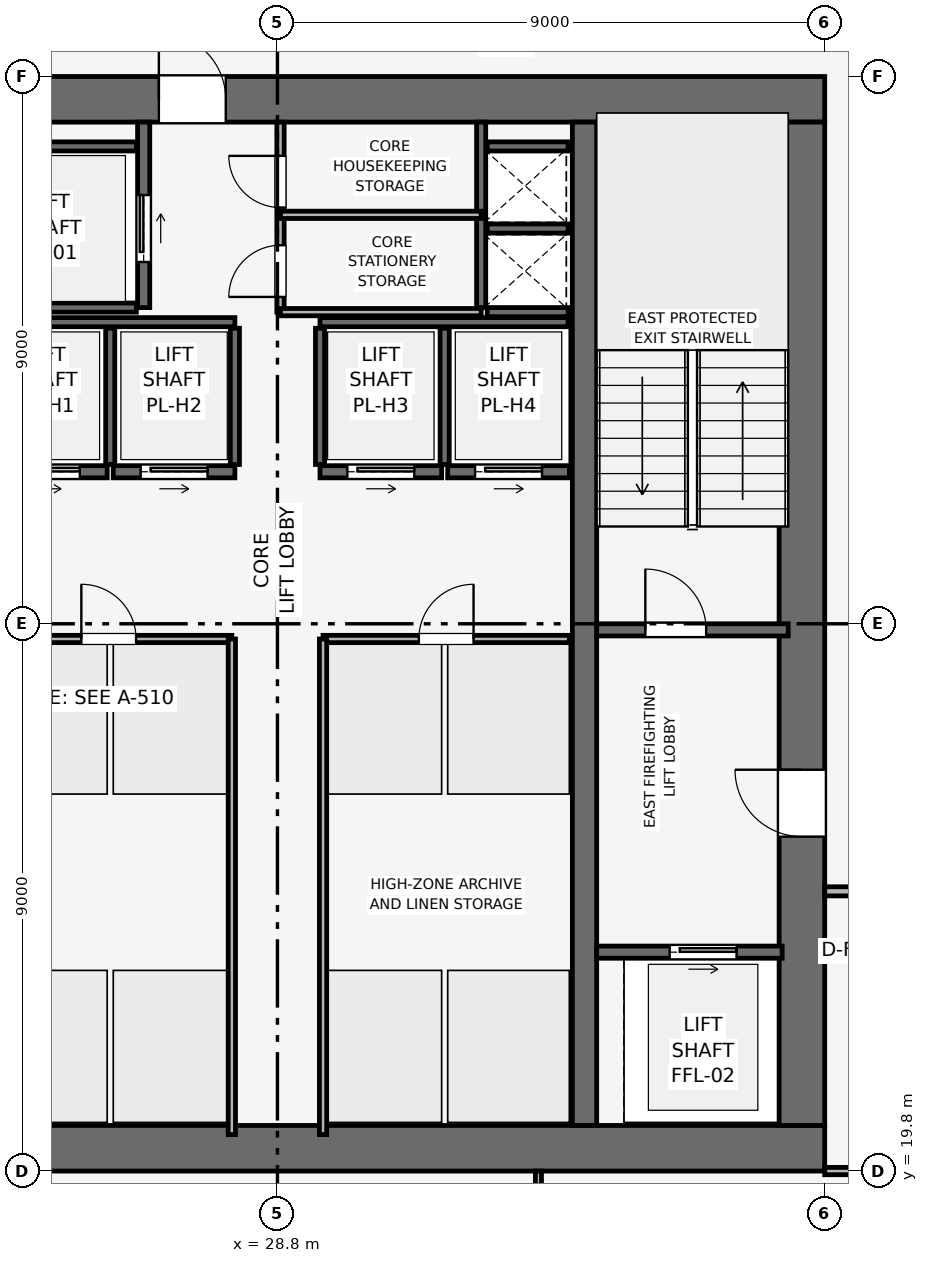
"""IFC4 building model, lengths in metres.
Left out: names, types, materials, properties, quantities, classifications, styles, units other than length and angle.
Written with IfcOpenShell. Run it as: python <this file> out.ifc"""

import sys

from ifc_helpers import new_model, si_unit, direction, frame, frame_2d, origin, place, context, subcontext, project, spatial, rectangle, extrude, element, fill, save


model = new_model("IFC4")
c1 = context("Model", 3, precision=1e-05, world=origin(), true_north=direction((0.0, 1.0)))
c2 = subcontext(c1, "Body", "Model", "MODEL_VIEW")
j1 = project(units=[si_unit("LENGTHUNIT", "METRE"), si_unit("PLANEANGLEUNIT", "RADIAN")], contexts=[c1])
p1 = place(None, origin())
s1 = spatial("IfcSite", under=j1, at=p1, CompositionType="ELEMENT")
p2 = place(p1, origin())
s2 = spatial("IfcBuilding", under=s1, at=p2, CompositionType="ELEMENT")
p3 = place(p2, frame((0.0, 0.0, 280.35)))
s3 = spatial("IfcBuildingStorey", under=s2, at=p3, CompositionType="ELEMENT", Elevation=280.35)
p4 = place(p3, frame((19.8, 20.175, 0.0), z_axis=(0.0, 0.0, 1.0), x_axis=(1.0, 0.0, 0.0)))
e1 = element("IfcWall", 1, at=p4, inside=s3, PredefinedType="SHEAR", context=c2, shape_type="SweptSolid", body=[
    extrude(rectangle(XDim=18.0, YDim=0.75, at=frame_2d((9.0, 0.0))), origin(), (0.0, 0.0, 1.0), 3.75),
])
p5 = place(p3, frame((19.8, 37.425, 0.0), z_axis=(0.0, 0.0, 1.0), x_axis=(1.0, 0.0, 0.0)))
e2 = element("IfcWall", 2, at=p5, inside=s3, PredefinedType="SHEAR", context=c2, shape_type="SweptSolid", body=[
    extrude(rectangle(XDim=18.0, YDim=0.75, at=frame_2d((9.0, 0.0))), origin(), (0.0, 0.0, 1.0), 3.75),
])
p6 = place(p5, frame((7.05, 0.0, 0.0)))
e3 = element("IfcOpeningElement", 3, at=p6, cuts=e2, PredefinedType="OPENING", context=c2, shape_type="SweptSolid", body=[
    extrude(rectangle(XDim=1.1, YDim=2.15, at=frame_2d((0.55, 1.075))), frame((0.0, 0.385, 0.0), z_axis=(0.0, -1.0, 0.0), x_axis=(1.0, 0.0, 0.0)), (0.0, 0.0, 1.0), 0.77),
])
p7 = place(p3, frame((37.425, 20.55, 0.0), z_axis=(0.0, 0.0, 1.0), x_axis=(0.0, 1.0, 0.0)))
e4 = element("IfcWall", 4, at=p7, inside=s3, PredefinedType="SHEAR", context=c2, shape_type="SweptSolid", body=[
    extrude(rectangle(XDim=16.5, YDim=0.75, at=frame_2d((8.25, 0.0))), origin(), (0.0, 0.0, 1.0), 3.75),
])
p8 = place(p7, frame((4.75, 0.0, 0.0)))
e5 = element("IfcOpeningElement", 5, at=p8, cuts=e4, PredefinedType="OPENING", context=c2, shape_type="SweptSolid", body=[
    extrude(rectangle(XDim=1.1, YDim=2.15, at=frame_2d((0.55, 1.075))), frame((0.0, 0.385, 0.0), z_axis=(0.0, -1.0, 0.0), x_axis=(1.0, 0.0, 0.0)), (0.0, 0.0, 1.0), 0.77),
])
p9 = place(p3, frame((33.85, 20.55, 0.0), z_axis=(0.0, 0.0, 1.0), x_axis=(0.0, 1.0, 0.0)))
e6 = element("IfcWall", 6, at=p9, inside=s3, PredefinedType="SHEAR", context=c2, shape_type="SweptSolid", body=[
    extrude(rectangle(XDim=16.5, YDim=0.4, at=frame_2d((8.25, 0.0))), origin(), (0.0, 0.0, 1.0), 3.75),
])
p10 = place(p3, frame((34.05, 28.7, 0.0), z_axis=(0.0, 0.0, 1.0), x_axis=(1.0, 0.0, 0.0)))
e7 = element("IfcWall", 7, at=p10, inside=s3, PredefinedType="SHEAR", context=c2, shape_type="SweptSolid", body=[
    extrude(rectangle(XDim=3.15, YDim=0.2, at=frame_2d((1.575, 0.0))), origin(), (0.0, 0.0, 1.0), 3.39),
])
p11 = place(p10, frame((0.8, 0.0, 0.0)))
e8 = element("IfcOpeningElement", 8, at=p11, cuts=e7, PredefinedType="OPENING", context=c2, shape_type="SweptSolid", body=[
    extrude(rectangle(XDim=1.0, YDim=2.1, at=frame_2d((0.5, 1.05))), frame((0.0, 0.11, 0.0), z_axis=(0.0, -1.0, 0.0), x_axis=(1.0, 0.0, 0.0)), (0.0, 0.0, 1.0), 0.22),
])
p12 = place(p3, frame((32.15, 34.0, 0.0), z_axis=(0.0, 0.0, 1.0), x_axis=(0.0, 1.0, 0.0)))
e9 = element("IfcWall", 9, at=p12, inside=s3, PredefinedType="SHEAR", context=c2, shape_type="SweptSolid", body=[
    extrude(rectangle(XDim=3.05, YDim=0.15, at=frame_2d((1.525, 0.0))), origin(), (0.0, 0.0, 1.0), 3.39),
])
for number, where, z_axis, x_axis in (
    (10, (32.25, 33.925, 0.0), (0.0, 0.0, 1.0), (1.0, 0.0, 0.0)),
    (11, (32.25, 35.3, 0.0), (0.0, 0.0, 1.0), (1.0, 0.0, 0.0)),
):
    element("IfcWall", number, at=place(p3, frame(where, z_axis=z_axis, x_axis=x_axis)), inside=s3, PredefinedType="SHEAR", context=c2, shape_type="SweptSolid", body=[
        extrude(rectangle(XDim=1.33, YDim=0.15, at=frame_2d((0.665, 0.0))), origin(), (0.0, 0.0, 1.0), 3.39),
    ])
p13 = place(p3, frame((34.05, 23.4, 0.0), z_axis=(0.0, 0.0, 1.0), x_axis=(1.0, 0.0, 0.0)))
e12 = element("IfcWall", 12, at=p13, inside=s3, PredefinedType="SHEAR", context=c2, shape_type="SweptSolid", body=[
    extrude(rectangle(XDim=3.05, YDim=0.2, at=frame_2d((1.525, 0.0))), origin(), (0.0, 0.0, 1.0), 3.39),
])
p14 = place(p13, frame((1.2, 0.0, 0.0)))
e13 = element("IfcOpeningElement", 13, at=p14, cuts=e12, PredefinedType="OPENING", context=c2, shape_type="SweptSolid", body=[
    extrude(rectangle(XDim=1.1, YDim=2.15, at=frame_2d((0.55, 1.075))), frame((0.0, 0.11, 0.0), z_axis=(0.0, -1.0, 0.0), x_axis=(1.0, 0.0, 0.0)), (0.0, 0.0, 1.0), 0.22),
])
p15 = place(p3, frame((26.6, 34.0, 0.0), z_axis=(0.0, 0.0, 1.0), x_axis=(0.0, 1.0, 0.0)))
e14 = element("IfcWall", 14, at=p15, inside=s3, PredefinedType="SHEAR", context=c2, shape_type="SweptSolid", body=[
    extrude(rectangle(XDim=3.05, YDim=0.2, at=frame_2d((1.525, 0.0))), origin(), (0.0, 0.0, 1.0), 3.39),
])
p16 = place(p15, frame((0.75, 0.0, 0.0)))
e15 = element("IfcOpeningElement", 15, at=p16, cuts=e14, PredefinedType="OPENING", context=c2, shape_type="SweptSolid", body=[
    extrude(rectangle(XDim=1.1, YDim=2.15, at=frame_2d((0.55, 1.075))), frame((0.0, 0.11, 0.0), z_axis=(0.0, -1.0, 0.0), x_axis=(1.0, 0.0, 0.0)), (0.0, 0.0, 1.0), 0.22),
])
for number, where, z_axis, x_axis in (
    (16, (24.0, 34.0, 0.0), (0.0, 0.0, 1.0), (1.0, 0.0, 0.0)),
    (17, (24.0, 36.65, 0.0), (0.0, 0.0, 1.0), (1.0, 0.0, 0.0)),
):
    element("IfcWall", number, at=place(p3, frame(where, z_axis=z_axis, x_axis=x_axis)), inside=s3, PredefinedType="SHEAR", context=c2, shape_type="SweptSolid", body=[
        extrude(rectangle(XDim=2.48, YDim=0.15, at=frame_2d((1.24, 0.0))), origin(), (0.0, 0.0, 1.0), 3.39),
    ])
p17 = place(p3, frame((24.0, 31.3, 0.0), z_axis=(0.0, 0.0, 1.0), x_axis=(1.0, 0.0, 0.0)))
e18 = element("IfcWall", 18, at=p17, inside=s3, PredefinedType="SHEAR", context=c2, shape_type="SweptSolid", body=[
    extrude(rectangle(XDim=2.0, YDim=0.2, at=frame_2d((1.0, 0.0))), origin(), (0.0, 0.0, 1.0), 3.39),
])
p18 = place(p17, frame((0.45, 0.0, 0.0)))
e19 = element("IfcOpeningElement", 19, at=p18, cuts=e18, PredefinedType="OPENING", context=c2, shape_type="SweptSolid", body=[
    extrude(rectangle(XDim=1.1, YDim=2.15, at=frame_2d((0.55, 1.075))), frame((0.0, 0.11, 0.0), z_axis=(0.0, -1.0, 0.0), x_axis=(1.0, 0.0, 0.0)), (0.0, 0.0, 1.0), 0.22),
])
p19 = place(p3, frame((26.1, 31.3, 0.0), z_axis=(0.0, 0.0, 1.0), x_axis=(1.0, 0.0, 0.0)))
e20 = element("IfcWall", 20, at=p19, inside=s3, PredefinedType="SHEAR", context=c2, shape_type="SweptSolid", body=[
    extrude(rectangle(XDim=2.0, YDim=0.2, at=frame_2d((1.0, 0.0))), origin(), (0.0, 0.0, 1.0), 3.39),
])
p20 = place(p19, frame((0.45, 0.0, 0.0)))
e21 = element("IfcOpeningElement", 21, at=p20, cuts=e20, PredefinedType="OPENING", context=c2, shape_type="SweptSolid", body=[
    extrude(rectangle(XDim=1.1, YDim=2.15, at=frame_2d((0.55, 1.075))), frame((0.0, 0.11, 0.0), z_axis=(0.0, -1.0, 0.0), x_axis=(1.0, 0.0, 0.0)), (0.0, 0.0, 1.0), 0.22),
])
p21 = place(p3, frame((29.5, 31.3, 0.0), z_axis=(0.0, 0.0, 1.0), x_axis=(1.0, 0.0, 0.0)))
e22 = element("IfcWall", 22, at=p21, inside=s3, PredefinedType="SHEAR", context=c2, shape_type="SweptSolid", body=[
    extrude(rectangle(XDim=2.0, YDim=0.2, at=frame_2d((1.0, 0.0))), origin(), (0.0, 0.0, 1.0), 3.39),
])
p22 = place(p21, frame((0.45, 0.0, 0.0)))
e23 = element("IfcOpeningElement", 23, at=p22, cuts=e22, PredefinedType="OPENING", context=c2, shape_type="SweptSolid", body=[
    extrude(rectangle(XDim=1.1, YDim=2.15, at=frame_2d((0.55, 1.075))), frame((0.0, 0.11, 0.0), z_axis=(0.0, -1.0, 0.0), x_axis=(1.0, 0.0, 0.0)), (0.0, 0.0, 1.0), 0.22),
])
p23 = place(p3, frame((31.6, 31.3, 0.0), z_axis=(0.0, 0.0, 1.0), x_axis=(1.0, 0.0, 0.0)))
e24 = element("IfcWall", 24, at=p23, inside=s3, PredefinedType="SHEAR", context=c2, shape_type="SweptSolid", body=[
    extrude(rectangle(XDim=2.0, YDim=0.2, at=frame_2d((1.0, 0.0))), origin(), (0.0, 0.0, 1.0), 3.39),
])
p24 = place(p23, frame((0.45, 0.0, 0.0)))
e25 = element("IfcOpeningElement", 25, at=p24, cuts=e24, PredefinedType="OPENING", context=c2, shape_type="SweptSolid", body=[
    extrude(rectangle(XDim=1.1, YDim=2.15, at=frame_2d((0.55, 1.075))), frame((0.0, 0.11, 0.0), z_axis=(0.0, -1.0, 0.0), x_axis=(1.0, 0.0, 0.0)), (0.0, 0.0, 1.0), 0.22),
])
p25 = place(p3, frame((32.25, 36.65, 0.0), z_axis=(0.0, 0.0, 1.0), x_axis=(1.0, 0.0, 0.0)))
e26 = element("IfcWall", 26, at=p25, inside=s3, PredefinedType="SHEAR", context=c2, shape_type="SweptSolid", body=[
    extrude(rectangle(XDim=1.33, YDim=0.15, at=frame_2d((0.665, 0.0))), origin(), (0.0, 0.0, 1.0), 3.39),
])
for number, where, z_axis, x_axis in (
    (27, (24.02, 33.76, 0.0), (0.0, 0.0, 1.0), (1.0, 0.0, 0.0)),
    (28, (29.5, 33.76, 0.0), (0.0, 0.0, 1.0), (1.0, 0.0, 0.0)),
):
    element("IfcWall", number, at=place(p3, frame(where, z_axis=z_axis, x_axis=x_axis)), inside=s3, PredefinedType="SHEAR", context=c2, shape_type="SweptSolid", body=[
        extrude(rectangle(XDim=4.08, YDim=0.15, at=frame_2d((2.04, 0.0))), origin(), (0.0, 0.0, 1.0), 3.39),
    ])
for number, where, z_axis, x_axis in (
    (29, (26.05, 31.42, 0.0), (0.0, 0.0, 1.0), (0.0, 1.0, 0.0)),
    (30, (28.1, 31.42, 0.0), (0.0, 0.0, 1.0), (0.0, 1.0, 0.0)),
    (31, (29.5, 31.42, 0.0), (0.0, 0.0, 1.0), (0.0, 1.0, 0.0)),
    (32, (31.55, 31.42, 0.0), (0.0, 0.0, 1.0), (0.0, 1.0, 0.0)),
):
    element("IfcWall", number, at=place(p3, frame(where, z_axis=z_axis, x_axis=x_axis)), inside=s3, PredefinedType="SHEAR", context=c2, shape_type="SweptSolid", body=[
        extrude(rectangle(XDim=2.24, YDim=0.15, at=frame_2d((1.12, 0.0))), origin(), (0.0, 0.0, 1.0), 3.39),
    ])
p26 = place(p3, frame((28.85, 33.925, 0.0), z_axis=(0.0, 0.0, 1.0), x_axis=(0.0, 1.0, 0.0)))
e33 = element("IfcWall", 33, at=p26, inside=s3, PredefinedType="PARTITIONING", context=c2, shape_type="SweptSolid", body=[
    extrude(rectangle(XDim=3.125, YDim=0.12, at=frame_2d((1.562, 0.0))), origin(), (0.0, 0.0, 1.0), 3.39),
])
p27 = place(p26, frame((0.25, 0.0, 0.0)))
e34 = element("IfcOpeningElement", 34, at=p27, cuts=e33, PredefinedType="OPENING", context=c2, shape_type="SweptSolid", body=[
    extrude(rectangle(XDim=0.85, YDim=2.1, at=frame_2d((0.425, 1.05))), frame((0.0, 0.07, 0.0), z_axis=(0.0, -1.0, 0.0), x_axis=(1.0, 0.0, 0.0)), (0.0, 0.0, 1.0), 0.14),
])
p28 = place(p26, frame((1.72, 0.0, 0.0)))
e35 = element("IfcOpeningElement", 35, at=p28, cuts=e33, PredefinedType="OPENING", context=c2, shape_type="SweptSolid", body=[
    extrude(rectangle(XDim=0.85, YDim=2.1, at=frame_2d((0.425, 1.05))), frame((0.0, 0.07, 0.0), z_axis=(0.0, -1.0, 0.0), x_axis=(1.0, 0.0, 0.0)), (0.0, 0.0, 1.0), 0.14),
])
for number, where, z_axis, x_axis in (
    (36, (28.85, 35.525, 0.0), (0.0, 0.0, 1.0), (1.0, 0.0, 0.0)),
    (37, (28.85, 33.925, 0.0), (0.0, 0.0, 1.0), (1.0, 0.0, 0.0)),
):
    element("IfcWall", number, at=place(p3, frame(where, z_axis=z_axis, x_axis=x_axis)), inside=s3, PredefinedType="PARTITIONING", context=c2, shape_type="SweptSolid", body=[
        extrude(rectangle(XDim=3.3, YDim=0.12, at=frame_2d((1.65, 0.0))), origin(), (0.0, 0.0, 1.0), 3.39),
    ])
p29 = place(p3, frame((24.0, 28.55, 0.0), z_axis=(0.0, 0.0, 1.0), x_axis=(1.0, 0.0, 0.0)))
e38 = element("IfcWall", 38, at=p29, inside=s3, PredefinedType="PARTITIONING", context=c2, shape_type="SweptSolid", body=[
    extrude(rectangle(XDim=4.05, YDim=0.12, at=frame_2d((2.025, 0.0))), origin(), (0.0, 0.0, 1.0), 3.39),
])
p30 = place(p29, frame((1.575, 0.0, 0.0)))
e39 = element("IfcOpeningElement", 39, at=p30, cuts=e38, PredefinedType="OPENING", context=c2, shape_type="SweptSolid", body=[
    extrude(rectangle(XDim=0.9, YDim=2.1, at=frame_2d((0.45, 1.05))), frame((0.0, 0.07, 0.0), z_axis=(0.0, -1.0, 0.0), x_axis=(1.0, 0.0, 0.0)), (0.0, 0.0, 1.0), 0.14),
])
p31 = place(p3, frame((28.05, 20.4, 0.0), z_axis=(0.0, 0.0, 1.0), x_axis=(0.0, 1.0, 0.0)))
e40 = element("IfcWall", 40, at=p31, inside=s3, PredefinedType="PARTITIONING", context=c2, shape_type="SweptSolid", body=[
    extrude(rectangle(XDim=8.15, YDim=0.12, at=frame_2d((4.075, 0.0))), origin(), (0.0, 0.0, 1.0), 3.39),
])
p32 = place(p3, frame((29.55, 28.55, 0.0), z_axis=(0.0, 0.0, 1.0), x_axis=(1.0, 0.0, 0.0)))
e41 = element("IfcWall", 41, at=p32, inside=s3, PredefinedType="PARTITIONING", context=c2, shape_type="SweptSolid", body=[
    extrude(rectangle(XDim=4.05, YDim=0.12, at=frame_2d((2.025, 0.0))), origin(), (0.0, 0.0, 1.0), 3.39),
])
p33 = place(p32, frame((1.575, 0.0, 0.0)))
e42 = element("IfcOpeningElement", 42, at=p33, cuts=e41, PredefinedType="OPENING", context=c2, shape_type="SweptSolid", body=[
    extrude(rectangle(XDim=0.9, YDim=2.1, at=frame_2d((0.45, 1.05))), frame((0.0, 0.07, 0.0), z_axis=(0.0, -1.0, 0.0), x_axis=(1.0, 0.0, 0.0)), (0.0, 0.0, 1.0), 0.14),
])
p34 = place(p3, frame((29.55, 20.4, 0.0), z_axis=(0.0, 0.0, 1.0), x_axis=(0.0, 1.0, 0.0)))
e43 = element("IfcWall", 43, at=p34, inside=s3, PredefinedType="PARTITIONING", context=c2, shape_type="SweptSolid", body=[
    extrude(rectangle(XDim=8.15, YDim=0.12, at=frame_2d((4.075, 0.0))), origin(), (0.0, 0.0, 1.0), 3.39),
])
p35 = place(p3, frame((33.092, 4.03, 0.0), z_axis=(0.0, 0.0, 1.0), x_axis=(0.0, 1.0, 0.0)))
e44 = element("IfcWall", 44, at=p35, inside=s3, PredefinedType="MOVABLE", context=c2, shape_type="SweptSolid", body=[
    extrude(rectangle(XDim=15.77, YDim=0.1, at=frame_2d((7.885, 0.0))), origin(), (0.0, 0.0, 1.0), 2.975),
])
p36 = place(p35, frame((13.37, 0.0, 0.0)))
e45 = element("IfcOpeningElement", 45, at=p36, cuts=e44, PredefinedType="OPENING", context=c2, shape_type="SweptSolid", body=[
    extrude(rectangle(XDim=0.9, YDim=2.1, at=frame_2d((0.45, 1.05))), frame((0.0, 0.06, 0.0), z_axis=(0.0, -1.0, 0.0), x_axis=(1.0, 0.0, 0.0)), (0.0, 0.0, 1.0), 0.12),
])
p37 = place(p3, frame((37.8, 19.8, 0.0), z_axis=(0.0, 0.0, 1.0), x_axis=(1.0, 0.0, 0.0)))
e46 = element("IfcWall", 46, at=p37, inside=s3, PredefinedType="PARTITIONING", context=c2, shape_type="SweptSolid", body=[
    extrude(rectangle(XDim=15.77, YDim=0.12, at=frame_2d((7.885, 0.0))), origin(), (0.0, 0.0, 1.0), 2.975),
])
p38 = place(p3, frame((37.8, 24.4, 0.0), z_axis=(0.0, 0.0, 1.0), x_axis=(1.0, 0.0, 0.0)))
e47 = element("IfcWall", 47, at=p38, inside=s3, PredefinedType="PARTITIONING", context=c2, shape_type="SweptSolid", body=[
    extrude(rectangle(XDim=1.9, YDim=0.15, at=frame_2d((0.95, 0.0))), origin(), (0.0, 0.0, 1.0), 3.39),
])
p39 = place(p38, frame((0.45, 0.0, 0.0)))
e48 = element("IfcOpeningElement", 48, at=p39, cuts=e47, PredefinedType="OPENING", context=c2, shape_type="SweptSolid", body=[
    extrude(rectangle(XDim=0.9, YDim=2.1, at=frame_2d((0.45, 1.05))), frame((0.0, 0.085, 0.0), z_axis=(0.0, -1.0, 0.0), x_axis=(1.0, 0.0, 0.0)), (0.0, 0.0, 1.0), 0.17),
])
p40 = place(p11, origin())
e49 = element("IfcDoor", 49, at=p40, inside=s3, OperationType="SINGLE_SWING_LEFT", PredefinedType="DOOR", context=c2, shape_type="SweptSolid", body=[
    extrude(rectangle(XDim=1.0, YDim=2.1, at=frame_2d((0.5, 1.05))), frame((0.0, 0.025, 0.0), z_axis=(0.0, -1.0, 0.0), x_axis=(1.0, 0.0, 0.0)), (0.0, 0.0, 1.0), 0.05),
])
fill(e8, e49)
p41 = place(p14, origin())
e50 = element("IfcDoor", 50, at=p41, inside=s3, OperationType="SLIDING_TO_RIGHT", PredefinedType="DOOR", context=c2, shape_type="SweptSolid", body=[
    extrude(rectangle(XDim=1.1, YDim=2.15, at=frame_2d((0.55, 1.075))), frame((0.0, 0.025, 0.0), z_axis=(0.0, -1.0, 0.0), x_axis=(1.0, 0.0, 0.0)), (0.0, 0.0, 1.0), 0.05),
])
fill(e13, e50)
p42 = place(p16, origin())
e51 = element("IfcDoor", 51, at=p42, inside=s3, OperationType="SLIDING_TO_RIGHT", PredefinedType="DOOR", context=c2, shape_type="SweptSolid", body=[
    extrude(rectangle(XDim=1.1, YDim=2.15, at=frame_2d((0.55, 1.075))), frame((0.0, 0.025, 0.0), z_axis=(0.0, -1.0, 0.0), x_axis=(1.0, 0.0, 0.0)), (0.0, 0.0, 1.0), 0.05),
])
fill(e15, e51)
p43 = place(p18, origin())
e52 = element("IfcDoor", 52, at=p43, inside=s3, OperationType="SLIDING_TO_RIGHT", PredefinedType="DOOR", context=c2, shape_type="SweptSolid", body=[
    extrude(rectangle(XDim=1.1, YDim=2.15, at=frame_2d((0.55, 1.075))), frame((0.0, 0.025, 0.0), z_axis=(0.0, -1.0, 0.0), x_axis=(1.0, 0.0, 0.0)), (0.0, 0.0, 1.0), 0.05),
])
fill(e19, e52)
p44 = place(p20, origin())
e53 = element("IfcDoor", 53, at=p44, inside=s3, OperationType="SLIDING_TO_RIGHT", PredefinedType="DOOR", context=c2, shape_type="SweptSolid", body=[
    extrude(rectangle(XDim=1.1, YDim=2.15, at=frame_2d((0.55, 1.075))), frame((0.0, 0.025, 0.0), z_axis=(0.0, -1.0, 0.0), x_axis=(1.0, 0.0, 0.0)), (0.0, 0.0, 1.0), 0.05),
])
fill(e21, e53)
p45 = place(p22, origin())
e54 = element("IfcDoor", 54, at=p45, inside=s3, OperationType="SLIDING_TO_RIGHT", PredefinedType="DOOR", context=c2, shape_type="SweptSolid", body=[
    extrude(rectangle(XDim=1.1, YDim=2.15, at=frame_2d((0.55, 1.075))), frame((0.0, 0.025, 0.0), z_axis=(0.0, -1.0, 0.0), x_axis=(1.0, 0.0, 0.0)), (0.0, 0.0, 1.0), 0.05),
])
fill(e23, e54)
p46 = place(p24, origin())
e55 = element("IfcDoor", 55, at=p46, inside=s3, OperationType="SLIDING_TO_RIGHT", PredefinedType="DOOR", context=c2, shape_type="SweptSolid", body=[
    extrude(rectangle(XDim=1.1, YDim=2.15, at=frame_2d((0.55, 1.075))), frame((0.0, 0.025, 0.0), z_axis=(0.0, -1.0, 0.0), x_axis=(1.0, 0.0, 0.0)), (0.0, 0.0, 1.0), 0.05),
])
fill(e25, e55)
p47 = place(p27, origin())
e56 = element("IfcDoor", 56, at=p47, inside=s3, OperationType="SINGLE_SWING_LEFT", PredefinedType="DOOR", context=c2, shape_type="SweptSolid", body=[
    extrude(rectangle(XDim=0.85, YDim=2.1, at=frame_2d((0.425, 1.05))), frame((0.0, 0.025, 0.0), z_axis=(0.0, -1.0, 0.0), x_axis=(1.0, 0.0, 0.0)), (0.0, 0.0, 1.0), 0.05),
])
fill(e34, e56)
p48 = place(p28, origin())
e57 = element("IfcDoor", 57, at=p48, inside=s3, OperationType="SINGLE_SWING_RIGHT", PredefinedType="DOOR", context=c2, shape_type="SweptSolid", body=[
    extrude(rectangle(XDim=0.85, YDim=2.1, at=frame_2d((0.425, 1.05))), frame((0.0, 0.025, 0.0), z_axis=(0.0, -1.0, 0.0), x_axis=(1.0, 0.0, 0.0)), (0.0, 0.0, 1.0), 0.05),
])
fill(e35, e57)
p49 = place(p30, origin())
e58 = element("IfcDoor", 58, at=p49, inside=s3, OperationType="SINGLE_SWING_LEFT", PredefinedType="DOOR", context=c2, shape_type="SweptSolid", body=[
    extrude(rectangle(XDim=0.9, YDim=2.1, at=frame_2d((0.45, 1.05))), frame((0.0, 0.025, 0.0), z_axis=(0.0, -1.0, 0.0), x_axis=(1.0, 0.0, 0.0)), (0.0, 0.0, 1.0), 0.05),
])
fill(e39, e58)
p50 = place(p33, origin())
e59 = element("IfcDoor", 59, at=p50, inside=s3, OperationType="SINGLE_SWING_RIGHT", PredefinedType="DOOR", context=c2, shape_type="SweptSolid", body=[
    extrude(rectangle(XDim=0.9, YDim=2.1, at=frame_2d((0.45, 1.05))), frame((0.0, 0.025, 0.0), z_axis=(0.0, -1.0, 0.0), x_axis=(1.0, 0.0, 0.0)), (0.0, 0.0, 1.0), 0.05),
])
fill(e42, e59)
p51 = place(p8, origin())
e60 = element("IfcDoor", 60, at=p51, inside=s3, OperationType="SINGLE_SWING_RIGHT", PredefinedType="DOOR", context=c2, shape_type="SweptSolid", body=[
    extrude(rectangle(XDim=1.1, YDim=2.15, at=frame_2d((0.55, 1.075))), frame((0.0, 0.025, 0.0), z_axis=(0.0, -1.0, 0.0), x_axis=(1.0, 0.0, 0.0)), (0.0, 0.0, 1.0), 0.05),
])
fill(e5, e60)
p52 = place(p6, origin())
e61 = element("IfcDoor", 61, at=p52, inside=s3, OperationType="SINGLE_SWING_LEFT", PredefinedType="DOOR", context=c2, shape_type="SweptSolid", body=[
    extrude(rectangle(XDim=1.1, YDim=2.15, at=frame_2d((0.55, 1.075))), frame((0.0, 0.025, 0.0), z_axis=(0.0, -1.0, 0.0), x_axis=(1.0, 0.0, 0.0)), (0.0, 0.0, 1.0), 0.05),
])
fill(e3, e61)
save(model, sys.argv[1])
